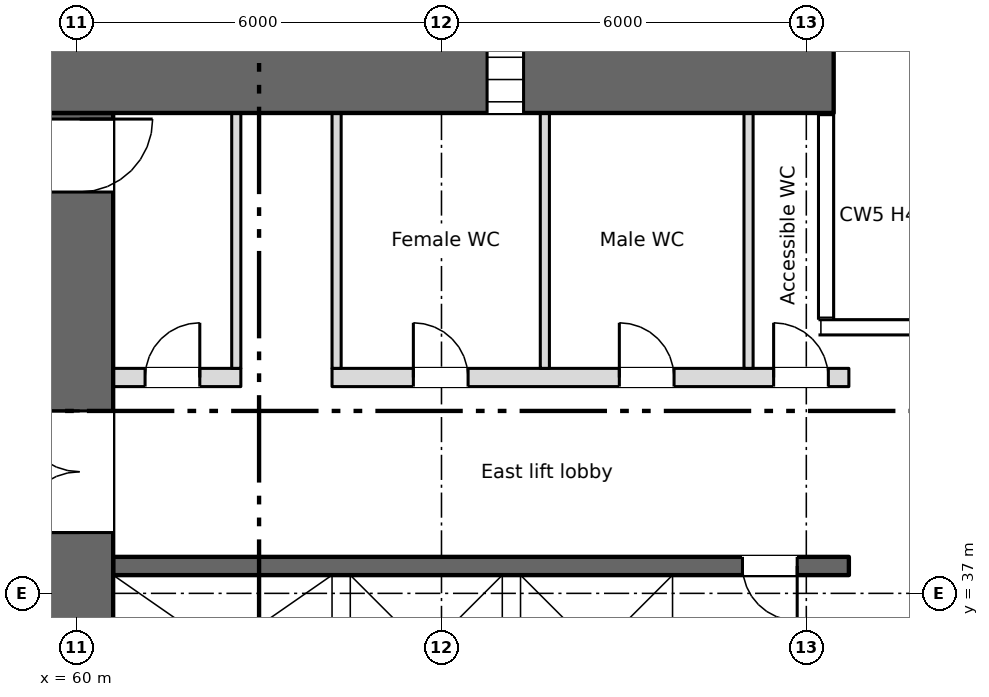
"""IFC4 building model, lengths in metres.
Left out: names, types, materials, properties, quantities, classifications, styles, units other than length and angle.
Written with IfcOpenShell. Run it as: python <this file> out.ifc"""

import sys

from ifc_helpers import new_model, si_unit, direction, frame, frame_2d, origin, place, context, subcontext, project, spatial, rectangle, extrude, element, fill, save


model = new_model("IFC4")
c1 = context("Model", 3, precision=1e-05, world=origin(), true_north=direction((0.0, 1.0)))
c2 = subcontext(c1, "Body", "Model", "MODEL_VIEW")
j1 = project(units=[si_unit("LENGTHUNIT", "METRE"), si_unit("PLANEANGLEUNIT", "RADIAN")], contexts=[c1])
p1 = place(None, origin())
s1 = spatial("IfcSite", under=j1, at=p1, CompositionType="ELEMENT")
p2 = place(p1, origin())
s2 = spatial("IfcBuilding", under=s1, at=p2, CompositionType="ELEMENT")
p3 = place(p2, frame((0.0, 0.0, 6.5)))
s3 = spatial("IfcBuildingStorey", under=s2, at=p3, CompositionType="ELEMENT", Elevation=6.5)
p4 = place(p3, frame((5.55, 45.45, 0.0), z_axis=(0.0, 0.0, 1.0), x_axis=(1.0, 0.0, 0.0)))
e1 = element("IfcWall", 1, at=p4, inside=s3, PredefinedType="SHEAR", context=c2, shape_type="SweptSolid", body=[
    extrude(rectangle(XDim=66.9, YDim=1.1, at=frame_2d((33.45, 0.0))), origin(), (0.0, 0.0, 1.0), 4.3),
])
p5 = place(p4, frame((1.2, 0.0, 0.6)))
e2 = element("IfcOpeningElement", 2, at=p5, cuts=e1, PredefinedType="OPENING", context=c2, shape_type="SweptSolid", body=[
    extrude(rectangle(XDim=0.6, YDim=2.7, at=frame_2d((0.3, 1.35))), frame((0.0, 0.56, 0.0), z_axis=(0.0, -1.0, 0.0), x_axis=(1.0, 0.0, 0.0)), (0.0, 0.0, 1.0), 1.12),
])
p6 = place(p4, frame((7.2, 0.0, 0.6)))
e3 = element("IfcOpeningElement", 3, at=p6, cuts=e1, PredefinedType="OPENING", context=c2, shape_type="SweptSolid", body=[
    extrude(rectangle(XDim=0.6, YDim=2.7, at=frame_2d((0.3, 1.35))), frame((0.0, 0.56, 0.0), z_axis=(0.0, -1.0, 0.0), x_axis=(1.0, 0.0, 0.0)), (0.0, 0.0, 1.0), 1.12),
])
p7 = place(p4, frame((61.2, 0.0, 0.6)))
e4 = element("IfcOpeningElement", 4, at=p7, cuts=e1, PredefinedType="OPENING", context=c2, shape_type="SweptSolid", body=[
    extrude(rectangle(XDim=0.6, YDim=2.7, at=frame_2d((0.3, 1.35))), frame((0.0, 0.56, 0.0), z_axis=(0.0, -1.0, 0.0), x_axis=(1.0, 0.0, 0.0)), (0.0, 0.0, 1.0), 1.12),
])
p8 = place(p3, frame((72.85, 28.4, 0.0), z_axis=(0.0, 0.0, 1.0), x_axis=(0.0, 1.0, 0.0)))
e5 = element("IfcWall", 5, at=p8, inside=s3, PredefinedType="SHEAR", context=c2, shape_type="SweptSolid", body=[
    extrude(rectangle(XDim=12.85, YDim=0.3, at=frame_2d((6.425, 0.0))), origin(), (0.0, 0.0, 1.0), 4.3),
])
p9 = place(p3, frame((64.35, 34.8, 0.0), z_axis=(0.0, 0.0, 1.0), x_axis=(0.0, 1.0, 0.0)))
e6 = element("IfcWall", 6, at=p9, inside=s3, PredefinedType="SHEAR", context=c2, shape_type="SweptSolid", body=[
    extrude(rectangle(XDim=2.5, YDim=0.3, at=frame_2d((1.25, 0.0))), origin(), (0.0, 0.0, 1.0), 4.3),
])
p10 = place(p3, frame((60.05, 28.4, 0.0), z_axis=(0.0, 0.0, 1.0), x_axis=(0.0, 1.0, 0.0)))
e7 = element("IfcWall", 7, at=p10, inside=s3, PredefinedType="SHEAR", context=c2, shape_type="SweptSolid", body=[
    extrude(rectangle(XDim=16.5, YDim=1.1, at=frame_2d((8.25, 0.0))), origin(), (0.0, 0.0, 1.0), 4.3),
])
p11 = place(p10, frame((9.6, 0.0, 0.0)))
e8 = element("IfcOpeningElement", 8, at=p11, cuts=e7, PredefinedType="OPENING", context=c2, shape_type="SweptSolid", body=[
    extrude(rectangle(XDim=2.0, YDim=2.1, at=frame_2d((1.0, 1.05))), frame((0.0, 0.56, 0.0), z_axis=(0.0, -1.0, 0.0), x_axis=(1.0, 0.0, 0.0)), (0.0, 0.0, 1.0), 1.12),
])
p12 = place(p10, frame((15.2, 0.0, 0.0)))
e9 = element("IfcOpeningElement", 9, at=p12, cuts=e7, PredefinedType="OPENING", context=c2, shape_type="SweptSolid", body=[
    extrude(rectangle(XDim=1.2, YDim=2.1, at=frame_2d((0.6, 1.05))), frame((0.0, 0.56, 0.0), z_axis=(0.0, -1.0, 0.0), x_axis=(1.0, 0.0, 0.0)), (0.0, 0.0, 1.0), 1.12),
])
p13 = place(p3, frame((72.7, 37.45, 0.0), z_axis=(0.0, 0.0, 1.0), x_axis=(-1.0, 0.0, 0.0)))
e10 = element("IfcWall", 10, at=p13, inside=s3, PredefinedType="SHEAR", context=c2, shape_type="SweptSolid", body=[
    extrude(rectangle(XDim=12.1, YDim=0.3, at=frame_2d((6.05, 0.0))), origin(), (0.0, 0.0, 1.0), 4.3),
])
p14 = place(p13, frame((0.85, 0.0, 0.0)))
e11 = element("IfcOpeningElement", 11, at=p14, cuts=e10, PredefinedType="OPENING", context=c2, shape_type="SweptSolid", body=[
    extrude(rectangle(XDim=0.9, YDim=2.1, at=frame_2d((0.45, 1.05))), frame((0.0, 0.16, 0.0), z_axis=(0.0, -1.0, 0.0), x_axis=(1.0, 0.0, 0.0)), (0.0, 0.0, 1.0), 0.32),
])
p15 = place(p13, frame((9.75, 0.0, 0.0)))
e12 = element("IfcOpeningElement", 12, at=p15, cuts=e10, PredefinedType="OPENING", context=c2, shape_type="SweptSolid", body=[
    extrude(rectangle(XDim=1.1, YDim=2.1, at=frame_2d((0.55, 1.05))), frame((0.0, 0.16, 0.0), z_axis=(0.0, -1.0, 0.0), x_axis=(1.0, 0.0, 0.0)), (0.0, 0.0, 1.0), 0.32),
])
p16 = place(p13, frame((6.4, 0.0, 0.0)))
e13 = element("IfcOpeningElement", 13, at=p16, cuts=e10, PredefinedType="OPENING", context=c2, shape_type="SweptSolid", body=[
    extrude(rectangle(XDim=1.1, YDim=2.1, at=frame_2d((0.55, 1.05))), frame((0.0, 0.16, 0.0), z_axis=(0.0, -1.0, 0.0), x_axis=(1.0, 0.0, 0.0)), (0.0, 0.0, 1.0), 0.32),
])
p17 = place(p13, frame((3.6, 0.0, 0.0)))
e14 = element("IfcOpeningElement", 14, at=p17, cuts=e10, PredefinedType="OPENING", context=c2, shape_type="SweptSolid", body=[
    extrude(rectangle(XDim=1.1, YDim=2.1, at=frame_2d((0.55, 1.05))), frame((0.0, 0.16, 0.0), z_axis=(0.0, -1.0, 0.0), x_axis=(1.0, 0.0, 0.0)), (0.0, 0.0, 1.0), 0.32),
])
p18 = place(p3, frame((60.6, 40.55, 0.0), z_axis=(0.0, 0.0, 1.0), x_axis=(1.0, 0.0, 0.0)))
e15 = element("IfcWall", 15, at=p18, inside=s3, PredefinedType="PARTITIONING", context=c2, shape_type="SweptSolid", body=[
    extrude(rectangle(XDim=2.1, YDim=0.3, at=frame_2d((1.05, 0.0))), origin(), (0.0, 0.0, 1.0), 4.3),
])
p19 = place(p18, frame((0.525, 0.0, 0.0)))
e16 = element("IfcOpeningElement", 16, at=p19, cuts=e15, PredefinedType="OPENING", context=c2, shape_type="SweptSolid", body=[
    extrude(rectangle(XDim=0.9, YDim=2.1, at=frame_2d((0.45, 1.05))), frame((0.0, 0.16, 0.0), z_axis=(0.0, -1.0, 0.0), x_axis=(1.0, 0.0, 0.0)), (0.0, 0.0, 1.0), 0.32),
])
p20 = place(p3, frame((64.2, 40.55, 0.0), z_axis=(0.0, 0.0, 1.0), x_axis=(1.0, 0.0, 0.0)))
e17 = element("IfcWall", 17, at=p20, inside=s3, PredefinedType="PARTITIONING", context=c2, shape_type="SweptSolid", body=[
    extrude(rectangle(XDim=8.5, YDim=0.3, at=frame_2d((4.25, 0.0))), origin(), (0.0, 0.0, 1.0), 4.3),
])
p21 = place(p20, frame((1.337, 0.0, 0.0)))
e18 = element("IfcOpeningElement", 18, at=p21, cuts=e17, PredefinedType="OPENING", context=c2, shape_type="SweptSolid", body=[
    extrude(rectangle(XDim=0.9, YDim=2.1, at=frame_2d((0.45, 1.05))), frame((0.0, 0.16, 0.0), z_axis=(0.0, -1.0, 0.0), x_axis=(1.0, 0.0, 0.0)), (0.0, 0.0, 1.0), 0.32),
])
p22 = place(p20, frame((4.725, 0.0, 0.0)))
e19 = element("IfcOpeningElement", 19, at=p22, cuts=e17, PredefinedType="OPENING", context=c2, shape_type="SweptSolid", body=[
    extrude(rectangle(XDim=0.9, YDim=2.1, at=frame_2d((0.45, 1.05))), frame((0.0, 0.16, 0.0), z_axis=(0.0, -1.0, 0.0), x_axis=(1.0, 0.0, 0.0)), (0.0, 0.0, 1.0), 0.32),
])
p23 = place(p20, frame((7.262, 0.0, 0.0)))
e20 = element("IfcOpeningElement", 20, at=p23, cuts=e17, PredefinedType="OPENING", context=c2, shape_type="SweptSolid", body=[
    extrude(rectangle(XDim=0.9, YDim=2.1, at=frame_2d((0.45, 1.05))), frame((0.0, 0.16, 0.0), z_axis=(0.0, -1.0, 0.0), x_axis=(1.0, 0.0, 0.0)), (0.0, 0.0, 1.0), 0.32),
])
for number, where, z_axis, x_axis in (
    (21, (67.15, 34.8, 0.0), (0.0, 0.0, 1.0), (0.0, 1.0, 0.0)),
    (22, (69.95, 34.8, 0.0), (0.0, 0.0, 1.0), (0.0, 1.0, 0.0)),
):
    element("IfcWall", number, at=place(p3, frame(where, z_axis=z_axis, x_axis=x_axis)), inside=s3, PredefinedType="SHEAR", context=c2, shape_type="SweptSolid", body=[
        extrude(rectangle(XDim=2.5, YDim=0.3, at=frame_2d((1.25, 0.0))), origin(), (0.0, 0.0, 1.0), 4.3),
    ])
for number, where, z_axis, x_axis in (
    (23, (62.625, 40.7, 0.0), (0.0, 0.0, 1.0), (0.0, 1.0, 0.0)),
    (24, (64.275, 40.7, 0.0), (0.0, 0.0, 1.0), (0.0, 1.0, 0.0)),
    (25, (67.7, 40.7, 0.0), (0.0, 0.0, 1.0), (0.0, 1.0, 0.0)),
    (26, (71.05, 40.7, 0.0), (0.0, 0.0, 1.0), (0.0, 1.0, 0.0)),
):
    element("IfcWall", number, at=place(p3, frame(where, z_axis=z_axis, x_axis=x_axis)), inside=s3, PredefinedType="PARTITIONING", context=c2, shape_type="SweptSolid", body=[
        extrude(rectangle(XDim=4.2, YDim=0.15, at=frame_2d((2.1, 0.0))), origin(), (0.0, 0.0, 1.0), 4.3),
    ])
p24 = place(p7, origin())
e27 = element("IfcWindow", 27, at=p24, inside=s3, PartitioningType="SINGLE_PANEL", PredefinedType="WINDOW", context=c2, shape_type="SweptSolid", body=[
    extrude(rectangle(XDim=0.6, YDim=2.7, at=frame_2d((0.3, 1.35))), frame((0.0, 0.03, 0.0), z_axis=(0.0, -1.0, 0.0), x_axis=(1.0, 0.0, 0.0)), (0.0, 0.0, 1.0), 0.06),
])
fill(e4, e27)
p25 = place(p19, origin())
e28 = element("IfcDoor", 28, at=p25, inside=s3, OperationType="SINGLE_SWING_RIGHT", PredefinedType="DOOR", context=c2, shape_type="SweptSolid", body=[
    extrude(rectangle(XDim=0.9, YDim=2.1, at=frame_2d((0.45, 1.05))), frame((0.0, 0.025, 0.0), z_axis=(0.0, -1.0, 0.0), x_axis=(1.0, 0.0, 0.0)), (0.0, 0.0, 1.0), 0.05),
])
fill(e16, e28)
p26 = place(p21, origin())
e29 = element("IfcDoor", 29, at=p26, inside=s3, OperationType="SINGLE_SWING_LEFT", PredefinedType="DOOR", context=c2, shape_type="SweptSolid", body=[
    extrude(rectangle(XDim=0.9, YDim=2.1, at=frame_2d((0.45, 1.05))), frame((0.0, 0.025, 0.0), z_axis=(0.0, -1.0, 0.0), x_axis=(1.0, 0.0, 0.0)), (0.0, 0.0, 1.0), 0.05),
])
fill(e18, e29)
p27 = place(p22, origin())
e30 = element("IfcDoor", 30, at=p27, inside=s3, OperationType="SINGLE_SWING_LEFT", PredefinedType="DOOR", context=c2, shape_type="SweptSolid", body=[
    extrude(rectangle(XDim=0.9, YDim=2.1, at=frame_2d((0.45, 1.05))), frame((0.0, 0.025, 0.0), z_axis=(0.0, -1.0, 0.0), x_axis=(1.0, 0.0, 0.0)), (0.0, 0.0, 1.0), 0.05),
])
fill(e19, e30)
p28 = place(p23, origin())
e31 = element("IfcDoor", 31, at=p28, inside=s3, OperationType="SINGLE_SWING_LEFT", PredefinedType="DOOR", context=c2, shape_type="SweptSolid", body=[
    extrude(rectangle(XDim=0.9, YDim=2.1, at=frame_2d((0.45, 1.05))), frame((0.0, 0.025, 0.0), z_axis=(0.0, -1.0, 0.0), x_axis=(1.0, 0.0, 0.0)), (0.0, 0.0, 1.0), 0.05),
])
fill(e20, e31)
p29 = place(p14, origin())
e32 = element("IfcDoor", 32, at=p29, inside=s3, OperationType="SINGLE_SWING_LEFT", PredefinedType="DOOR", context=c2, shape_type="SweptSolid", body=[
    extrude(rectangle(XDim=0.9, YDim=2.1, at=frame_2d((0.45, 1.05))), frame((0.0, 0.025, 0.0), z_axis=(0.0, -1.0, 0.0), x_axis=(1.0, 0.0, 0.0)), (0.0, 0.0, 1.0), 0.05),
])
fill(e11, e32)
p30 = place(p15, origin())
e33 = element("IfcDoor", 33, at=p30, inside=s3, OperationType="SLIDING_TO_LEFT", PredefinedType="DOOR", context=c2, shape_type="SweptSolid", body=[
    extrude(rectangle(XDim=1.1, YDim=2.1, at=frame_2d((0.55, 1.05))), frame((0.0, 0.025, 0.0), z_axis=(0.0, -1.0, 0.0), x_axis=(1.0, 0.0, 0.0)), (0.0, 0.0, 1.0), 0.05),
])
fill(e12, e33)
p31 = place(p16, origin())
e34 = element("IfcDoor", 34, at=p31, inside=s3, OperationType="SLIDING_TO_LEFT", PredefinedType="DOOR", context=c2, shape_type="SweptSolid", body=[
    extrude(rectangle(XDim=1.1, YDim=2.1, at=frame_2d((0.55, 1.05))), frame((0.0, 0.025, 0.0), z_axis=(0.0, -1.0, 0.0), x_axis=(1.0, 0.0, 0.0)), (0.0, 0.0, 1.0), 0.05),
])
fill(e13, e34)
p32 = place(p17, origin())
e35 = element("IfcDoor", 35, at=p32, inside=s3, OperationType="SLIDING_TO_LEFT", PredefinedType="DOOR", context=c2, shape_type="SweptSolid", body=[
    extrude(rectangle(XDim=1.1, YDim=2.1, at=frame_2d((0.55, 1.05))), frame((0.0, 0.025, 0.0), z_axis=(0.0, -1.0, 0.0), x_axis=(1.0, 0.0, 0.0)), (0.0, 0.0, 1.0), 0.05),
])
fill(e14, e35)
p33 = place(p11, origin())
e36 = element("IfcDoor", 36, at=p33, inside=s3, OperationType="DOUBLE_DOOR_SINGLE_SWING", PredefinedType="DOOR", context=c2, shape_type="SweptSolid", body=[
    extrude(rectangle(XDim=2.0, YDim=2.1, at=frame_2d((1.0, 1.05))), frame((0.0, 0.025, 0.0), z_axis=(0.0, -1.0, 0.0), x_axis=(1.0, 0.0, 0.0)), (0.0, 0.0, 1.0), 0.05),
])
fill(e8, e36)
p34 = place(p12, origin())
e37 = element("IfcDoor", 37, at=p34, inside=s3, OperationType="SINGLE_SWING_RIGHT", PredefinedType="DOOR", context=c2, shape_type="SweptSolid", body=[
    extrude(rectangle(XDim=1.2, YDim=2.1, at=frame_2d((0.6, 1.05))), frame((0.0, 0.025, 0.0), z_axis=(0.0, -1.0, 0.0), x_axis=(1.0, 0.0, 0.0)), (0.0, 0.0, 1.0), 0.05),
])
fill(e9, e37)
save(model, sys.argv[1])
